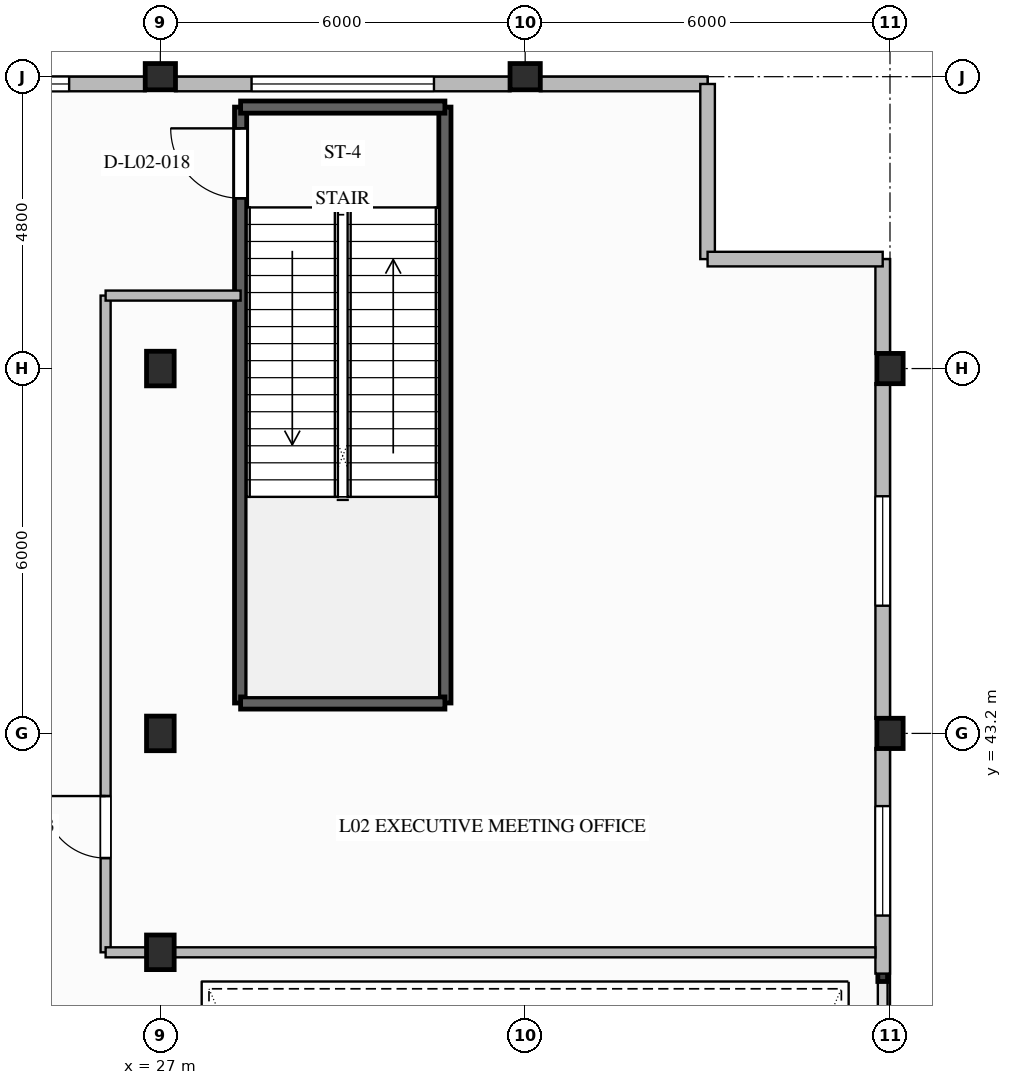
"""IFC4 building model, lengths in metres.
Left out: names, types, materials, properties, quantities, classifications, styles, units other than length and angle.
Written with IfcOpenShell. Run it as: python <this file> out.ifc"""

import sys

from ifc_helpers import new_model, si_unit, direction, frame, frame_2d, origin, origin_2d, place, context, subcontext, project, spatial, rectangle, i_section, extrude, element, fill, save


model = new_model("IFC4")
c1 = context("Model", 3, precision=1e-05, world=origin(), true_north=direction((0.0, 1.0)))
c2 = subcontext(c1, "Body", "Model", "MODEL_VIEW")
j1 = project(units=[si_unit("LENGTHUNIT", "METRE"), si_unit("PLANEANGLEUNIT", "RADIAN")], contexts=[c1])
p1 = place(None, origin())
s1 = spatial("IfcSite", under=j1, at=p1, CompositionType="ELEMENT")
p2 = place(p1, origin())
s2 = spatial("IfcBuilding", under=s1, at=p2, CompositionType="ELEMENT")
p3 = place(p2, frame((0.0, 0.0, 10.8)))
s3 = spatial("IfcBuildingStorey", under=s2, at=p3, CompositionType="ELEMENT", Elevation=10.8)
for number, where, z_axis, x_axis in (
    (1, (39.0, 43.2, 0.0), (0.0, 0.0, 1.0), (1.0, 0.0, 0.0)),
    (2, (39.0, 49.2, 0.0), (0.0, 0.0, 1.0), (1.0, 0.0, 0.0)),
    (3, (27.0, 54.0, 0.0), (0.0, 0.0, 1.0), (0.0, 1.0, 0.0)),
    (4, (33.0, 54.0, 0.0), (0.0, 0.0, 1.0), (0.0, 1.0, 0.0)),
):
    element("IfcColumn", number, at=place(p3, frame(where, z_axis=z_axis, x_axis=x_axis)), inside=s3, PredefinedType="COLUMN", context=c2, shape_type="SweptSolid", body=[
        extrude(i_section(OverallWidth=0.432, OverallDepth=0.498, WebThickness=0.056, FlangeThickness=0.089, FilletRadius=0.03, at=origin_2d()), origin(), (0.0, 0.0, 1.0), 6.4),
    ])
for number, where, z_axis, x_axis in (
    (5, (27.0, 39.6, 0.0), (0.0, 0.0, 1.0), (1.0, 0.0, 0.0)),
    (6, (27.0, 43.2, 0.0), (0.0, 0.0, 1.0), (1.0, 0.0, 0.0)),
    (7, (27.0, 49.2, 0.0), (0.0, 0.0, 1.0), (1.0, 0.0, 0.0)),
):
    element("IfcColumn", number, at=place(p3, frame(where, z_axis=z_axis, x_axis=x_axis)), inside=s3, PredefinedType="COLUMN", context=c2, shape_type="SweptSolid", body=[
        extrude(i_section(OverallWidth=0.454, OverallDepth=0.569, WebThickness=0.078, FlangeThickness=0.125, FilletRadius=0.03, at=origin_2d()), origin(), (0.0, 0.0, 1.0), 6.4),
    ])
p4 = place(p3, frame((38.88, 42.959, 0.0), z_axis=(0.0, 0.0, 1.0), x_axis=(0.0, -1.0, 0.0)))
e8 = element("IfcWall", 8, at=p4, inside=s3, PredefinedType="STANDARD", context=c2, shape_type="SweptSolid", body=[
    extrude(rectangle(XDim=3.709, YDim=0.24, at=frame_2d((1.854, 0.0))), origin(), (0.0, 0.0, 1.0), 5.404),
])
p5 = place(p4, frame((0.955, 0.0, 0.85)))
e9 = element("IfcOpeningElement", 9, at=p5, cuts=e8, PredefinedType="OPENING", context=c2, shape_type="SweptSolid", body=[
    extrude(rectangle(XDim=1.8, YDim=2.2, at=frame_2d((0.9, 1.1))), frame((0.0, 0.13, 0.0), z_axis=(0.0, -1.0, 0.0), x_axis=(1.0, 0.0, 0.0)), (0.0, 0.0, 1.0), 0.26),
])
p6 = place(p3, frame((38.88, 48.959, 0.0), z_axis=(0.0, 0.0, 1.0), x_axis=(0.0, -1.0, 0.0)))
e10 = element("IfcWall", 10, at=p6, inside=s3, PredefinedType="STANDARD", context=c2, shape_type="SweptSolid", body=[
    extrude(rectangle(XDim=5.518, YDim=0.24, at=frame_2d((2.759, 0.0))), origin(), (0.0, 0.0, 1.0), 5.404),
])
p7 = place(p6, frame((1.859, 0.0, 0.85)))
e11 = element("IfcOpeningElement", 11, at=p7, cuts=e10, PredefinedType="OPENING", context=c2, shape_type="SweptSolid", body=[
    extrude(rectangle(XDim=1.8, YDim=2.2, at=frame_2d((0.9, 1.1))), frame((0.0, 0.13, 0.0), z_axis=(0.0, -1.0, 0.0), x_axis=(1.0, 0.0, 0.0)), (0.0, 0.0, 1.0), 0.26),
])
p8 = place(p3, frame((38.88, 51.0, 0.0), z_axis=(0.0, 0.0, 1.0), x_axis=(0.0, -1.0, 0.0)))
e12 = element("IfcWall", 12, at=p8, inside=s3, PredefinedType="STANDARD", context=c2, shape_type="SweptSolid", body=[
    extrude(rectangle(XDim=1.559, YDim=0.24, at=frame_2d((0.78, 0.0))), origin(), (0.0, 0.0, 1.0), 6.1),
])
p9 = place(p3, frame((22.441, 53.88, 0.0), z_axis=(0.0, 0.0, 1.0), x_axis=(1.0, 0.0, 0.0)))
e13 = element("IfcWall", 13, at=p9, inside=s3, PredefinedType="STANDARD", context=c2, shape_type="SweptSolid", body=[
    extrude(rectangle(XDim=4.318, YDim=0.24, at=frame_2d((2.159, 0.0))), origin(), (0.0, 0.0, 1.0), 5.404),
])
p10 = place(p9, frame((1.259, 0.0, 0.65)))
e14 = element("IfcOpeningElement", 14, at=p10, cuts=e13, PredefinedType="OPENING", context=c2, shape_type="SweptSolid", body=[
    extrude(rectangle(XDim=1.8, YDim=2.2, at=frame_2d((0.9, 1.1))), frame((0.0, 0.13, 0.0), z_axis=(0.0, -1.0, 0.0), x_axis=(1.0, 0.0, 0.0)), (0.0, 0.0, 1.0), 0.26),
])
p11 = place(p3, frame((27.241, 53.88, 0.0), z_axis=(0.0, 0.0, 1.0), x_axis=(1.0, 0.0, 0.0)))
e15 = element("IfcWall", 15, at=p11, inside=s3, PredefinedType="STANDARD", context=c2, shape_type="SweptSolid", body=[
    extrude(rectangle(XDim=5.518, YDim=0.24, at=frame_2d((2.759, 0.0))), origin(), (0.0, 0.0, 1.0), 5.404),
])
p12 = place(p11, frame((1.259, 0.0, 0.65)))
e16 = element("IfcOpeningElement", 16, at=p12, cuts=e15, PredefinedType="OPENING", context=c2, shape_type="SweptSolid", body=[
    extrude(rectangle(XDim=3.0, YDim=2.2, at=frame_2d((1.5, 1.1))), frame((0.0, 0.13, 0.0), z_axis=(0.0, -1.0, 0.0), x_axis=(1.0, 0.0, 0.0)), (0.0, 0.0, 1.0), 0.26),
])
p13 = place(p3, frame((33.241, 53.88, 0.0), z_axis=(0.0, 0.0, 1.0), x_axis=(1.0, 0.0, 0.0)))
e17 = element("IfcWall", 17, at=p13, inside=s3, PredefinedType="STANDARD", context=c2, shape_type="SweptSolid", body=[
    extrude(rectangle(XDim=2.759, YDim=0.24, at=frame_2d((1.379, 0.0))), origin(), (0.0, 0.0, 1.0), 6.1),
])
for number, where, z_axis, x_axis in (
    (18, (36.0, 53.88, 0.0), (0.0, 0.0, 1.0), (0.0, -1.0, 0.0)),
    (19, (36.0, 51.0, 0.0), (0.0, 0.0, 1.0), (1.0, 0.0, 0.0)),
):
    element("IfcWall", number, at=place(p3, frame(where, z_axis=z_axis, x_axis=x_axis)), inside=s3, PredefinedType="STANDARD", context=c2, shape_type="SweptSolid", body=[
        extrude(rectangle(XDim=2.88, YDim=0.24, at=frame_2d((1.44, 0.0))), origin(), (0.0, 0.0, 1.0), 6.1),
    ])
p14 = place(p3, frame((28.32, 43.7, 0.0), z_axis=(0.0, 0.0, 1.0), x_axis=(0.0, 1.0, 0.0)))
e20 = element("IfcWall", 20, at=p14, inside=s3, PredefinedType="SOLIDWALL", context=c2, shape_type="SweptSolid", body=[
    extrude(rectangle(XDim=9.8, YDim=0.2, at=frame_2d((4.9, 0.0))), origin(), (0.0, 0.0, 1.0), 6.1),
])
p15 = place(p14, frame((8.3, 0.0, 0.0)))
e21 = element("IfcOpeningElement", 21, at=p15, cuts=e20, PredefinedType="OPENING", context=c2, shape_type="SweptSolid", body=[
    extrude(rectangle(XDim=1.15, YDim=2.15, at=frame_2d((0.575, 1.075))), frame((0.0, 0.11, 0.0), z_axis=(0.0, -1.0, 0.0), x_axis=(1.0, 0.0, 0.0)), (0.0, 0.0, 1.0), 0.22),
])
p16 = place(p3, frame((31.68, 53.5, 0.0), z_axis=(0.0, 0.0, 1.0), x_axis=(0.0, -1.0, 0.0)))
e22 = element("IfcWall", 22, at=p16, inside=s3, PredefinedType="SOLIDWALL", context=c2, shape_type="SweptSolid", body=[
    extrude(rectangle(XDim=9.8, YDim=0.2, at=frame_2d((4.9, 0.0))), origin(), (0.0, 0.0, 1.0), 6.1),
])
for number, where, z_axis, x_axis in (
    (23, (28.32, 43.7, 0.0), (0.0, 0.0, 1.0), (1.0, 0.0, 0.0)),
    (24, (31.68, 53.5, 0.0), (0.0, 0.0, 1.0), (-1.0, 0.0, 0.0)),
):
    element("IfcWall", number, at=place(p3, frame(where, z_axis=z_axis, x_axis=x_axis)), inside=s3, PredefinedType="SOLIDWALL", context=c2, shape_type="SweptSolid", body=[
        extrude(rectangle(XDim=3.36, YDim=0.2, at=frame_2d((1.68, 0.0))), origin(), (0.0, 0.0, 1.0), 6.1),
    ])
p17 = place(p3, frame((26.1, 39.6, 0.0), z_axis=(0.0, 0.0, 1.0), x_axis=(0.0, 1.0, 0.0)))
e25 = element("IfcWall", 25, at=p17, inside=s3, PredefinedType="PARTITIONING", context=c2, shape_type="SweptSolid", body=[
    extrude(rectangle(XDim=10.8, YDim=0.165, at=frame_2d((5.4, 0.0))), origin(), (0.0, 0.0, 1.0), 6.1),
])
p18 = place(p17, frame((1.55, 0.0, 0.0)))
e26 = element("IfcOpeningElement", 26, at=p18, cuts=e25, PredefinedType="OPENING", context=c2, shape_type="SweptSolid", body=[
    extrude(rectangle(XDim=1.02, YDim=2.15, at=frame_2d((0.51, 1.075))), frame((0.0, 0.093, 0.0), z_axis=(0.0, -1.0, 0.0), x_axis=(1.0, 0.0, 0.0)), (0.0, 0.0, 1.0), 0.185),
])
p19 = place(p3, frame((26.1, 50.4, 0.0), z_axis=(0.0, 0.0, 1.0), x_axis=(1.0, 0.0, 0.0)))
e27 = element("IfcWall", 27, at=p19, inside=s3, PredefinedType="PARTITIONING", context=c2, shape_type="SweptSolid", body=[
    extrude(rectangle(XDim=2.22, YDim=0.165, at=frame_2d((1.11, 0.0))), origin(), (0.0, 0.0, 1.0), 6.1),
])
p20 = place(p3, frame((26.1, 39.6, 0.0), z_axis=(0.0, 0.0, 1.0), x_axis=(1.0, 0.0, 0.0)))
e28 = element("IfcWall", 28, at=p20, inside=s3, PredefinedType="PARTITIONING", context=c2, shape_type="SweptSolid", body=[
    extrude(rectangle(XDim=12.66, YDim=0.165, at=frame_2d((6.33, 0.0))), origin(), (0.0, 0.0, 1.0), 5.625),
])
p21 = place(p5, origin())
e29 = element("IfcWindow", 29, at=p21, inside=s3, PartitioningType="SINGLE_PANEL", PredefinedType="WINDOW", context=c2, shape_type="SweptSolid", body=[
    extrude(rectangle(XDim=1.8, YDim=2.2, at=frame_2d((0.9, 1.1))), frame((0.0, 0.03, 0.0), z_axis=(0.0, -1.0, 0.0), x_axis=(1.0, 0.0, 0.0)), (0.0, 0.0, 1.0), 0.06),
])
fill(e9, e29)
p22 = place(p7, origin())
e30 = element("IfcWindow", 30, at=p22, inside=s3, PartitioningType="SINGLE_PANEL", PredefinedType="WINDOW", context=c2, shape_type="SweptSolid", body=[
    extrude(rectangle(XDim=1.8, YDim=2.2, at=frame_2d((0.9, 1.1))), frame((0.0, 0.03, 0.0), z_axis=(0.0, -1.0, 0.0), x_axis=(1.0, 0.0, 0.0)), (0.0, 0.0, 1.0), 0.06),
])
fill(e11, e30)
p23 = place(p10, origin())
e31 = element("IfcWindow", 31, at=p23, inside=s3, PartitioningType="SINGLE_PANEL", PredefinedType="WINDOW", context=c2, shape_type="SweptSolid", body=[
    extrude(rectangle(XDim=1.8, YDim=2.2, at=frame_2d((0.9, 1.1))), frame((0.0, 0.03, 0.0), z_axis=(0.0, -1.0, 0.0), x_axis=(1.0, 0.0, 0.0)), (0.0, 0.0, 1.0), 0.06),
])
fill(e14, e31)
p24 = place(p12, origin())
e32 = element("IfcWindow", 32, at=p24, inside=s3, PartitioningType="SINGLE_PANEL", PredefinedType="WINDOW", context=c2, shape_type="SweptSolid", body=[
    extrude(rectangle(XDim=3.0, YDim=2.2, at=frame_2d((1.5, 1.1))), frame((0.0, 0.03, 0.0), z_axis=(0.0, -1.0, 0.0), x_axis=(1.0, 0.0, 0.0)), (0.0, 0.0, 1.0), 0.06),
])
fill(e16, e32)
p25 = place(p15, origin())
e33 = element("IfcDoor", 33, at=p25, inside=s3, OperationType="SINGLE_SWING_RIGHT", PredefinedType="DOOR", context=c2, shape_type="SweptSolid", body=[
    extrude(rectangle(XDim=1.15, YDim=2.15, at=frame_2d((0.575, 1.075))), frame((0.0, 0.025, 0.0), z_axis=(0.0, -1.0, 0.0), x_axis=(1.0, 0.0, 0.0)), (0.0, 0.0, 1.0), 0.05),
])
fill(e21, e33)
p26 = place(p18, origin())
e34 = element("IfcDoor", 34, at=p26, inside=s3, OperationType="SINGLE_SWING_RIGHT", PredefinedType="DOOR", context=c2, shape_type="SweptSolid", body=[
    extrude(rectangle(XDim=1.02, YDim=2.15, at=frame_2d((0.51, 1.075))), frame((0.0, 0.025, 0.0), z_axis=(0.0, -1.0, 0.0), x_axis=(1.0, 0.0, 0.0)), (0.0, 0.0, 1.0), 0.05),
])
fill(e26, e34)
save(model, sys.argv[1])
